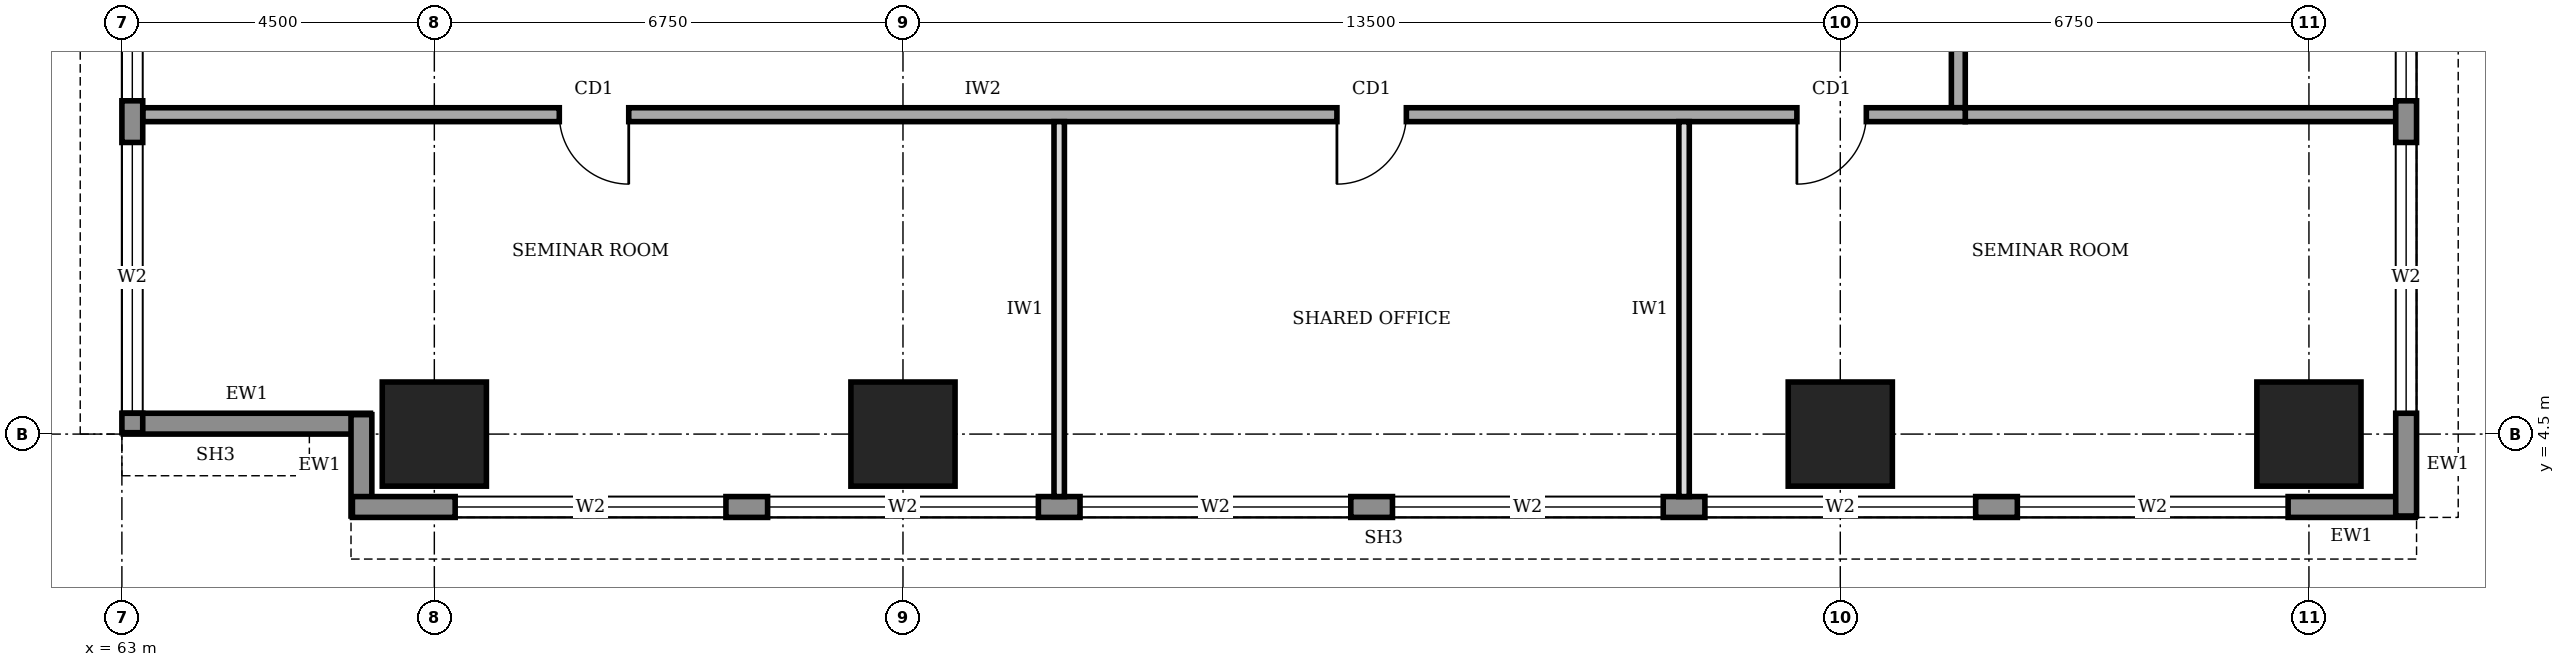
"""IFC4 building model, lengths in metres.
Left out: names, types, materials, properties, quantities, classifications, styles, units other than length and angle.
Written with IfcOpenShell. Run it as: python <this file> out.ifc"""

import sys

from ifc_helpers import new_model, si_unit, direction, frame, frame_2d, origin, origin_2d, place, context, subcontext, project, spatial, rectangle, extrude, element, fill, save


model = new_model("IFC4")
c1 = context("Model", 3, precision=1e-05, world=origin(), true_north=direction((0.0, 1.0)))
c2 = subcontext(c1, "Body", "Model", "MODEL_VIEW")
j1 = project(units=[si_unit("LENGTHUNIT", "METRE"), si_unit("PLANEANGLEUNIT", "RADIAN")], contexts=[c1])
p1 = place(None, origin())
s1 = spatial("IfcSite", under=j1, at=p1, CompositionType="ELEMENT")
p2 = place(p1, origin())
s2 = spatial("IfcBuilding", under=s1, at=p2, CompositionType="ELEMENT")
p3 = place(p2, frame((0.0, 0.0, 145.0)))
s3 = spatial("IfcBuildingStorey", under=s2, at=p3, CompositionType="ELEMENT", Elevation=145.0)
for number, where, z_axis, x_axis in (
    (1, (67.5, 4.5, 0.0), (0.0, 0.0, 1.0), (1.0, 0.0, 0.0)),
    (2, (74.25, 4.5, 0.0), (0.0, 0.0, 1.0), (1.0, 0.0, 0.0)),
    (3, (87.75, 4.5, 0.0), (0.0, 0.0, 1.0), (1.0, 0.0, 0.0)),
    (4, (94.5, 4.5, 0.0), (0.0, 0.0, 1.0), (1.0, 0.0, 0.0)),
):
    element("IfcColumn", number, at=place(p3, frame(where, z_axis=z_axis, x_axis=x_axis)), inside=s3, PredefinedType="COLUMN", context=c2, shape_type="SweptSolid", body=[
        extrude(rectangle(XDim=1.5, YDim=1.5, at=origin_2d()), origin(), (0.0, 0.0, 1.0), 4.0),
    ])
p4 = place(p3, frame((63.02, 4.65, 0.0), z_axis=(0.0, 0.0, 1.0), x_axis=(1.0, 0.0, 0.0)))
e5 = element("IfcWall", 5, at=p4, inside=s3, PredefinedType="STANDARD", context=c2, shape_type="SweptSolid", body=[
    extrude(rectangle(XDim=3.56, YDim=0.3, at=frame_2d((1.78, 0.0))), origin(), (0.0, 0.0, 1.0), 2.85),
])
p5 = place(p3, frame((66.45, 4.78, 0.0), z_axis=(0.0, 0.0, 1.0), x_axis=(0.0, -1.0, 0.0)))
e6 = element("IfcWall", 6, at=p5, inside=s3, PredefinedType="STANDARD", context=c2, shape_type="SweptSolid", body=[
    extrude(rectangle(XDim=1.46, YDim=0.3, at=frame_2d((0.73, 0.0))), origin(), (0.0, 0.0, 1.0), 3.75),
])
p6 = place(p3, frame((66.32, 3.45, 0.0), z_axis=(0.0, 0.0, 1.0), x_axis=(1.0, 0.0, 0.0)))
e7 = element("IfcWall", 7, at=p6, inside=s3, PredefinedType="STANDARD", context=c2, shape_type="SweptSolid", body=[
    extrude(rectangle(XDim=29.71, YDim=0.3, at=frame_2d((14.855, 0.0))), origin(), (0.0, 0.0, 1.0), 3.75),
])
p7 = place(p6, frame((1.48, 0.0, 0.6)))
e8 = element("IfcOpeningElement", 8, at=p7, cuts=e7, PredefinedType="OPENING", context=c2, shape_type="SweptSolid", body=[
    extrude(rectangle(XDim=3.9, YDim=2.6, at=frame_2d((1.95, 1.3))), frame((0.0, 0.16, 0.0), z_axis=(0.0, -1.0, 0.0), x_axis=(1.0, 0.0, 0.0)), (0.0, 0.0, 1.0), 0.32),
])
p8 = place(p6, frame((5.98, 0.0, 0.6)))
e9 = element("IfcOpeningElement", 9, at=p8, cuts=e7, PredefinedType="OPENING", context=c2, shape_type="SweptSolid", body=[
    extrude(rectangle(XDim=3.9, YDim=2.6, at=frame_2d((1.95, 1.3))), frame((0.0, 0.16, 0.0), z_axis=(0.0, -1.0, 0.0), x_axis=(1.0, 0.0, 0.0)), (0.0, 0.0, 1.0), 0.32),
])
p9 = place(p6, frame((10.48, 0.0, 0.6)))
e10 = element("IfcOpeningElement", 10, at=p9, cuts=e7, PredefinedType="OPENING", context=c2, shape_type="SweptSolid", body=[
    extrude(rectangle(XDim=3.9, YDim=2.6, at=frame_2d((1.95, 1.3))), frame((0.0, 0.16, 0.0), z_axis=(0.0, -1.0, 0.0), x_axis=(1.0, 0.0, 0.0)), (0.0, 0.0, 1.0), 0.32),
])
p10 = place(p6, frame((14.98, 0.0, 0.6)))
e11 = element("IfcOpeningElement", 11, at=p10, cuts=e7, PredefinedType="OPENING", context=c2, shape_type="SweptSolid", body=[
    extrude(rectangle(XDim=3.9, YDim=2.6, at=frame_2d((1.95, 1.3))), frame((0.0, 0.16, 0.0), z_axis=(0.0, -1.0, 0.0), x_axis=(1.0, 0.0, 0.0)), (0.0, 0.0, 1.0), 0.32),
])
p11 = place(p6, frame((19.48, 0.0, 0.6)))
e12 = element("IfcOpeningElement", 12, at=p11, cuts=e7, PredefinedType="OPENING", context=c2, shape_type="SweptSolid", body=[
    extrude(rectangle(XDim=3.9, YDim=2.6, at=frame_2d((1.95, 1.3))), frame((0.0, 0.16, 0.0), z_axis=(0.0, -1.0, 0.0), x_axis=(1.0, 0.0, 0.0)), (0.0, 0.0, 1.0), 0.32),
])
p12 = place(p6, frame((23.98, 0.0, 0.6)))
e13 = element("IfcOpeningElement", 13, at=p12, cuts=e7, PredefinedType="OPENING", context=c2, shape_type="SweptSolid", body=[
    extrude(rectangle(XDim=3.9, YDim=2.6, at=frame_2d((1.95, 1.3))), frame((0.0, 0.16, 0.0), z_axis=(0.0, -1.0, 0.0), x_axis=(1.0, 0.0, 0.0)), (0.0, 0.0, 1.0), 0.32),
])
p13 = place(p3, frame((95.9, 3.32, 0.0), z_axis=(0.0, 0.0, 1.0), x_axis=(0.0, 1.0, 0.0)))
e14 = element("IfcWall", 14, at=p13, inside=s3, PredefinedType="STANDARD", context=c2, shape_type="SweptSolid", body=[
    extrude(rectangle(XDim=33.86, YDim=0.3, at=frame_2d((16.93, 0.0))), origin(), (0.0, 0.0, 1.0), 3.75),
])
p14 = place(p13, frame((1.48, 0.0, 0.6)))
e15 = element("IfcOpeningElement", 15, at=p14, cuts=e14, PredefinedType="OPENING", context=c2, shape_type="SweptSolid", body=[
    extrude(rectangle(XDim=3.9, YDim=2.6, at=frame_2d((1.95, 1.3))), frame((0.0, 0.16, 0.0), z_axis=(0.0, -1.0, 0.0), x_axis=(1.0, 0.0, 0.0)), (0.0, 0.0, 1.0), 0.32),
])
p15 = place(p13, frame((5.98, 0.0, 0.6)))
e16 = element("IfcOpeningElement", 16, at=p15, cuts=e14, PredefinedType="OPENING", context=c2, shape_type="SweptSolid", body=[
    extrude(rectangle(XDim=3.9, YDim=2.6, at=frame_2d((1.95, 1.3))), frame((0.0, 0.16, 0.0), z_axis=(0.0, -1.0, 0.0), x_axis=(1.0, 0.0, 0.0)), (0.0, 0.0, 1.0), 0.32),
])
p16 = place(p13, frame((10.48, 0.0, 0.6)))
e17 = element("IfcOpeningElement", 17, at=p16, cuts=e14, PredefinedType="OPENING", context=c2, shape_type="SweptSolid", body=[
    extrude(rectangle(XDim=3.9, YDim=2.6, at=frame_2d((1.95, 1.3))), frame((0.0, 0.16, 0.0), z_axis=(0.0, -1.0, 0.0), x_axis=(1.0, 0.0, 0.0)), (0.0, 0.0, 1.0), 0.32),
])
p17 = place(p13, frame((14.98, 0.0, 0.6)))
e18 = element("IfcOpeningElement", 18, at=p17, cuts=e14, PredefinedType="OPENING", context=c2, shape_type="SweptSolid", body=[
    extrude(rectangle(XDim=3.9, YDim=2.6, at=frame_2d((1.95, 1.3))), frame((0.0, 0.16, 0.0), z_axis=(0.0, -1.0, 0.0), x_axis=(1.0, 0.0, 0.0)), (0.0, 0.0, 1.0), 0.32),
])
p18 = place(p13, frame((19.48, 0.0, 0.6)))
e19 = element("IfcOpeningElement", 19, at=p18, cuts=e14, PredefinedType="OPENING", context=c2, shape_type="SweptSolid", body=[
    extrude(rectangle(XDim=3.9, YDim=2.6, at=frame_2d((1.95, 1.3))), frame((0.0, 0.16, 0.0), z_axis=(0.0, -1.0, 0.0), x_axis=(1.0, 0.0, 0.0)), (0.0, 0.0, 1.0), 0.32),
])
p19 = place(p13, frame((23.98, 0.0, 0.6)))
e20 = element("IfcOpeningElement", 20, at=p19, cuts=e14, PredefinedType="OPENING", context=c2, shape_type="SweptSolid", body=[
    extrude(rectangle(XDim=3.9, YDim=2.6, at=frame_2d((1.95, 1.3))), frame((0.0, 0.16, 0.0), z_axis=(0.0, -1.0, 0.0), x_axis=(1.0, 0.0, 0.0)), (0.0, 0.0, 1.0), 0.32),
])
p20 = place(p13, frame((28.48, 0.0, 0.6)))
e21 = element("IfcOpeningElement", 21, at=p20, cuts=e14, PredefinedType="OPENING", context=c2, shape_type="SweptSolid", body=[
    extrude(rectangle(XDim=3.9, YDim=2.6, at=frame_2d((1.95, 1.3))), frame((0.0, 0.16, 0.0), z_axis=(0.0, -1.0, 0.0), x_axis=(1.0, 0.0, 0.0)), (0.0, 0.0, 1.0), 0.32),
])
p21 = place(p3, frame((63.15, 35.98, 0.0), z_axis=(0.0, 0.0, 1.0), x_axis=(0.0, -1.0, 0.0)))
e22 = element("IfcWall", 22, at=p21, inside=s3, PredefinedType="STANDARD", context=c2, shape_type="SweptSolid", body=[
    extrude(rectangle(XDim=31.46, YDim=0.3, at=frame_2d((15.73, 0.0))), origin(), (0.0, 0.0, 1.0), 3.75),
])
p22 = place(p21, frame((27.28, 0.0, 0.6)))
e23 = element("IfcOpeningElement", 23, at=p22, cuts=e22, PredefinedType="OPENING", context=c2, shape_type="SweptSolid", body=[
    extrude(rectangle(XDim=3.9, YDim=2.6, at=frame_2d((1.95, 1.3))), frame((0.0, 0.16, 0.0), z_axis=(0.0, -1.0, 0.0), x_axis=(1.0, 0.0, 0.0)), (0.0, 0.0, 1.0), 0.32),
])
p23 = place(p21, frame((22.78, 0.0, 0.6)))
e24 = element("IfcOpeningElement", 24, at=p23, cuts=e22, PredefinedType="OPENING", context=c2, shape_type="SweptSolid", body=[
    extrude(rectangle(XDim=3.9, YDim=2.6, at=frame_2d((1.95, 1.3))), frame((0.0, 0.16, 0.0), z_axis=(0.0, -1.0, 0.0), x_axis=(1.0, 0.0, 0.0)), (0.0, 0.0, 1.0), 0.32),
])
p24 = place(p21, frame((18.28, 0.0, 0.6)))
e25 = element("IfcOpeningElement", 25, at=p24, cuts=e22, PredefinedType="OPENING", context=c2, shape_type="SweptSolid", body=[
    extrude(rectangle(XDim=3.9, YDim=2.6, at=frame_2d((1.95, 1.3))), frame((0.0, 0.16, 0.0), z_axis=(0.0, -1.0, 0.0), x_axis=(1.0, 0.0, 0.0)), (0.0, 0.0, 1.0), 0.32),
])
p25 = place(p21, frame((13.78, 0.0, 0.6)))
e26 = element("IfcOpeningElement", 26, at=p25, cuts=e22, PredefinedType="OPENING", context=c2, shape_type="SweptSolid", body=[
    extrude(rectangle(XDim=3.9, YDim=2.6, at=frame_2d((1.95, 1.3))), frame((0.0, 0.16, 0.0), z_axis=(0.0, -1.0, 0.0), x_axis=(1.0, 0.0, 0.0)), (0.0, 0.0, 1.0), 0.32),
])
p26 = place(p21, frame((9.28, 0.0, 0.6)))
e27 = element("IfcOpeningElement", 27, at=p26, cuts=e22, PredefinedType="OPENING", context=c2, shape_type="SweptSolid", body=[
    extrude(rectangle(XDim=3.9, YDim=2.6, at=frame_2d((1.95, 1.3))), frame((0.0, 0.16, 0.0), z_axis=(0.0, -1.0, 0.0), x_axis=(1.0, 0.0, 0.0)), (0.0, 0.0, 1.0), 0.32),
])
p27 = place(p21, frame((4.78, 0.0, 0.6)))
e28 = element("IfcOpeningElement", 28, at=p27, cuts=e22, PredefinedType="OPENING", context=c2, shape_type="SweptSolid", body=[
    extrude(rectangle(XDim=3.9, YDim=2.6, at=frame_2d((1.95, 1.3))), frame((0.0, 0.16, 0.0), z_axis=(0.0, -1.0, 0.0), x_axis=(1.0, 0.0, 0.0)), (0.0, 0.0, 1.0), 0.32),
])
p28 = place(p3, frame((63.3, 9.1, 0.0), z_axis=(0.0, 0.0, 1.0), x_axis=(1.0, 0.0, 0.0)))
e29 = element("IfcWall", 29, at=p28, inside=s3, PredefinedType="SOLIDWALL", context=c2, shape_type="SweptSolid", body=[
    extrude(rectangle(XDim=26.25, YDim=0.2, at=frame_2d((13.125, 0.0))), origin(), (0.0, 0.0, 1.0), 3.75),
])
p29 = place(p28, frame((6.0, 0.0, 0.0)))
e30 = element("IfcOpeningElement", 30, at=p29, cuts=e29, PredefinedType="OPENING", context=c2, shape_type="SweptSolid", body=[
    extrude(rectangle(XDim=1.0, YDim=2.1, at=frame_2d((0.5, 1.05))), frame((0.0, 0.11, 0.0), z_axis=(0.0, -1.0, 0.0), x_axis=(1.0, 0.0, 0.0)), (0.0, 0.0, 1.0), 0.22),
])
p30 = place(p28, frame((17.2, 0.0, 0.0)))
e31 = element("IfcOpeningElement", 31, at=p30, cuts=e29, PredefinedType="OPENING", context=c2, shape_type="SweptSolid", body=[
    extrude(rectangle(XDim=1.0, YDim=2.1, at=frame_2d((0.5, 1.05))), frame((0.0, 0.11, 0.0), z_axis=(0.0, -1.0, 0.0), x_axis=(1.0, 0.0, 0.0)), (0.0, 0.0, 1.0), 0.22),
])
p31 = place(p28, frame((23.825, 0.0, 0.0)))
e32 = element("IfcOpeningElement", 32, at=p31, cuts=e29, PredefinedType="OPENING", context=c2, shape_type="SweptSolid", body=[
    extrude(rectangle(XDim=1.0, YDim=2.1, at=frame_2d((0.5, 1.05))), frame((0.0, 0.11, 0.0), z_axis=(0.0, -1.0, 0.0), x_axis=(1.0, 0.0, 0.0)), (0.0, 0.0, 1.0), 0.22),
])
p32 = place(p3, frame((89.45, 9.2, 0.0), z_axis=(0.0, 0.0, 1.0), x_axis=(0.0, 1.0, 0.0)))
e33 = element("IfcWall", 33, at=p32, inside=s3, PredefinedType="SOLIDWALL", context=c2, shape_type="SweptSolid", body=[
    extrude(rectangle(XDim=23.8, YDim=0.2, at=frame_2d((11.9, 0.0))), origin(), (0.0, 0.0, 1.0), 3.75),
])
p33 = place(p32, frame((1.55, 0.0, 0.0)))
e34 = element("IfcOpeningElement", 34, at=p33, cuts=e33, PredefinedType="OPENING", context=c2, shape_type="SweptSolid", body=[
    extrude(rectangle(XDim=1.0, YDim=2.1, at=frame_2d((0.5, 1.05))), frame((0.0, 0.11, 0.0), z_axis=(0.0, -1.0, 0.0), x_axis=(1.0, 0.0, 0.0)), (0.0, 0.0, 1.0), 0.22),
])
p34 = place(p32, frame((5.55, 0.0, 0.0)))
e35 = element("IfcOpeningElement", 35, at=p34, cuts=e33, PredefinedType="OPENING", context=c2, shape_type="SweptSolid", body=[
    extrude(rectangle(XDim=0.9, YDim=2.1, at=frame_2d((0.45, 1.05))), frame((0.0, 0.11, 0.0), z_axis=(0.0, -1.0, 0.0), x_axis=(1.0, 0.0, 0.0)), (0.0, 0.0, 1.0), 0.22),
])
p35 = place(p32, frame((10.35, 0.0, 0.0)))
e36 = element("IfcOpeningElement", 36, at=p35, cuts=e33, PredefinedType="OPENING", context=c2, shape_type="SweptSolid", body=[
    extrude(rectangle(XDim=0.9, YDim=2.1, at=frame_2d((0.45, 1.05))), frame((0.0, 0.11, 0.0), z_axis=(0.0, -1.0, 0.0), x_axis=(1.0, 0.0, 0.0)), (0.0, 0.0, 1.0), 0.22),
])
p36 = place(p32, frame((13.4, 0.0, 0.0)))
e37 = element("IfcOpeningElement", 37, at=p36, cuts=e33, PredefinedType="OPENING", context=c2, shape_type="SweptSolid", body=[
    extrude(rectangle(XDim=0.9, YDim=2.1, at=frame_2d((0.45, 1.05))), frame((0.0, 0.11, 0.0), z_axis=(0.0, -1.0, 0.0), x_axis=(1.0, 0.0, 0.0)), (0.0, 0.0, 1.0), 0.22),
])
p37 = place(p32, frame((16.3, 0.0, 0.0)))
e38 = element("IfcOpeningElement", 38, at=p37, cuts=e33, PredefinedType="OPENING", context=c2, shape_type="SweptSolid", body=[
    extrude(rectangle(XDim=1.0, YDim=2.1, at=frame_2d((0.5, 1.05))), frame((0.0, 0.11, 0.0), z_axis=(0.0, -1.0, 0.0), x_axis=(1.0, 0.0, 0.0)), (0.0, 0.0, 1.0), 0.22),
])
p38 = place(p32, frame((8.2, 0.0, 0.0)))
e39 = element("IfcOpeningElement", 39, at=p38, cuts=e33, PredefinedType="OPENING", context=c2, shape_type="SweptSolid", body=[
    extrude(rectangle(XDim=1.0, YDim=2.1, at=frame_2d((0.5, 1.05))), frame((0.0, 0.11, 0.0), z_axis=(0.0, -1.0, 0.0), x_axis=(1.0, 0.0, 0.0)), (0.0, 0.0, 1.0), 0.22),
])
p39 = place(p32, frame((20.3, 0.0, 0.0)))
e40 = element("IfcOpeningElement", 40, at=p39, cuts=e33, PredefinedType="OPENING", context=c2, shape_type="SweptSolid", body=[
    extrude(rectangle(XDim=1.0, YDim=2.1, at=frame_2d((0.5, 1.05))), frame((0.0, 0.11, 0.0), z_axis=(0.0, -1.0, 0.0), x_axis=(1.0, 0.0, 0.0)), (0.0, 0.0, 1.0), 0.22),
])
p40 = place(p3, frame((89.55, 9.1, 0.0), z_axis=(0.0, 0.0, 1.0), x_axis=(1.0, 0.0, 0.0)))
e41 = element("IfcWall", 41, at=p40, inside=s3, PredefinedType="SOLIDWALL", context=c2, shape_type="SweptSolid", body=[
    extrude(rectangle(XDim=6.2, YDim=0.2, at=frame_2d((3.1, 0.0))), origin(), (0.0, 0.0, 1.0), 3.75),
])
for number, where, z_axis, x_axis in (
    (42, (76.5, 3.6, 0.0), (0.0, 0.0, 1.0), (0.0, 1.0, 0.0)),
    (43, (85.5, 3.6, 0.0), (0.0, 0.0, 1.0), (0.0, 1.0, 0.0)),
):
    element("IfcWall", number, at=place(p3, frame(where, z_axis=z_axis, x_axis=x_axis)), inside=s3, PredefinedType="PARTITIONING", context=c2, shape_type="SweptSolid", body=[
        extrude(rectangle(XDim=5.4, YDim=0.15, at=frame_2d((2.7, 0.0))), origin(), (0.0, 0.0, 1.0), 3.75),
    ])
p41 = place(p7, origin())
e44 = element("IfcWindow", 44, at=p41, inside=s3, PartitioningType="SINGLE_PANEL", PredefinedType="WINDOW", context=c2, shape_type="SweptSolid", body=[
    extrude(rectangle(XDim=3.9, YDim=2.6, at=frame_2d((1.95, 1.3))), frame((0.0, 0.03, 0.0), z_axis=(0.0, -1.0, 0.0), x_axis=(1.0, 0.0, 0.0)), (0.0, 0.0, 1.0), 0.06),
])
fill(e8, e44)
p42 = place(p8, origin())
e45 = element("IfcWindow", 45, at=p42, inside=s3, PartitioningType="SINGLE_PANEL", PredefinedType="WINDOW", context=c2, shape_type="SweptSolid", body=[
    extrude(rectangle(XDim=3.9, YDim=2.6, at=frame_2d((1.95, 1.3))), frame((0.0, 0.03, 0.0), z_axis=(0.0, -1.0, 0.0), x_axis=(1.0, 0.0, 0.0)), (0.0, 0.0, 1.0), 0.06),
])
fill(e9, e45)
p43 = place(p9, origin())
e46 = element("IfcWindow", 46, at=p43, inside=s3, PartitioningType="SINGLE_PANEL", PredefinedType="WINDOW", context=c2, shape_type="SweptSolid", body=[
    extrude(rectangle(XDim=3.9, YDim=2.6, at=frame_2d((1.95, 1.3))), frame((0.0, 0.03, 0.0), z_axis=(0.0, -1.0, 0.0), x_axis=(1.0, 0.0, 0.0)), (0.0, 0.0, 1.0), 0.06),
])
fill(e10, e46)
p44 = place(p10, origin())
e47 = element("IfcWindow", 47, at=p44, inside=s3, PartitioningType="SINGLE_PANEL", PredefinedType="WINDOW", context=c2, shape_type="SweptSolid", body=[
    extrude(rectangle(XDim=3.9, YDim=2.6, at=frame_2d((1.95, 1.3))), frame((0.0, 0.03, 0.0), z_axis=(0.0, -1.0, 0.0), x_axis=(1.0, 0.0, 0.0)), (0.0, 0.0, 1.0), 0.06),
])
fill(e11, e47)
p45 = place(p11, origin())
e48 = element("IfcWindow", 48, at=p45, inside=s3, PartitioningType="SINGLE_PANEL", PredefinedType="WINDOW", context=c2, shape_type="SweptSolid", body=[
    extrude(rectangle(XDim=3.9, YDim=2.6, at=frame_2d((1.95, 1.3))), frame((0.0, 0.03, 0.0), z_axis=(0.0, -1.0, 0.0), x_axis=(1.0, 0.0, 0.0)), (0.0, 0.0, 1.0), 0.06),
])
fill(e12, e48)
p46 = place(p12, origin())
e49 = element("IfcWindow", 49, at=p46, inside=s3, PartitioningType="SINGLE_PANEL", PredefinedType="WINDOW", context=c2, shape_type="SweptSolid", body=[
    extrude(rectangle(XDim=3.9, YDim=2.6, at=frame_2d((1.95, 1.3))), frame((0.0, 0.03, 0.0), z_axis=(0.0, -1.0, 0.0), x_axis=(1.0, 0.0, 0.0)), (0.0, 0.0, 1.0), 0.06),
])
fill(e13, e49)
p47 = place(p14, origin())
e50 = element("IfcWindow", 50, at=p47, inside=s3, PartitioningType="SINGLE_PANEL", PredefinedType="WINDOW", context=c2, shape_type="SweptSolid", body=[
    extrude(rectangle(XDim=3.9, YDim=2.6, at=frame_2d((1.95, 1.3))), frame((0.0, 0.03, 0.0), z_axis=(0.0, -1.0, 0.0), x_axis=(1.0, 0.0, 0.0)), (0.0, 0.0, 1.0), 0.06),
])
fill(e15, e50)
p48 = place(p15, origin())
e51 = element("IfcWindow", 51, at=p48, inside=s3, PartitioningType="SINGLE_PANEL", PredefinedType="WINDOW", context=c2, shape_type="SweptSolid", body=[
    extrude(rectangle(XDim=3.9, YDim=2.6, at=frame_2d((1.95, 1.3))), frame((0.0, 0.03, 0.0), z_axis=(0.0, -1.0, 0.0), x_axis=(1.0, 0.0, 0.0)), (0.0, 0.0, 1.0), 0.06),
])
fill(e16, e51)
p49 = place(p22, origin())
e52 = element("IfcWindow", 52, at=p49, inside=s3, PartitioningType="SINGLE_PANEL", PredefinedType="WINDOW", context=c2, shape_type="SweptSolid", body=[
    extrude(rectangle(XDim=3.9, YDim=2.6, at=frame_2d((1.95, 1.3))), frame((0.0, 0.03, 0.0), z_axis=(0.0, -1.0, 0.0), x_axis=(1.0, 0.0, 0.0)), (0.0, 0.0, 1.0), 0.06),
])
fill(e23, e52)
p50 = place(p23, origin())
e53 = element("IfcWindow", 53, at=p50, inside=s3, PartitioningType="SINGLE_PANEL", PredefinedType="WINDOW", context=c2, shape_type="SweptSolid", body=[
    extrude(rectangle(XDim=3.9, YDim=2.6, at=frame_2d((1.95, 1.3))), frame((0.0, 0.03, 0.0), z_axis=(0.0, -1.0, 0.0), x_axis=(1.0, 0.0, 0.0)), (0.0, 0.0, 1.0), 0.06),
])
fill(e24, e53)
p51 = place(p29, frame((1.0, 0.0, 0.0), z_axis=(0.0, 0.0, 1.0), x_axis=(-1.0, 0.0, 0.0)))
e54 = element("IfcDoor", 54, at=p51, inside=s3, OperationType="SINGLE_SWING_LEFT", PredefinedType="DOOR", context=c2, shape_type="SweptSolid", body=[
    extrude(rectangle(XDim=1.0, YDim=2.1, at=frame_2d((0.5, 1.05))), frame((0.0, 0.025, 0.0), z_axis=(0.0, -1.0, 0.0), x_axis=(1.0, 0.0, 0.0)), (0.0, 0.0, 1.0), 0.05),
])
fill(e30, e54)
p52 = place(p30, frame((1.0, 0.0, 0.0), z_axis=(0.0, 0.0, 1.0), x_axis=(-1.0, 0.0, 0.0)))
e55 = element("IfcDoor", 55, at=p52, inside=s3, OperationType="SINGLE_SWING_RIGHT", PredefinedType="DOOR", context=c2, shape_type="SweptSolid", body=[
    extrude(rectangle(XDim=1.0, YDim=2.1, at=frame_2d((0.5, 1.05))), frame((0.0, 0.025, 0.0), z_axis=(0.0, -1.0, 0.0), x_axis=(1.0, 0.0, 0.0)), (0.0, 0.0, 1.0), 0.05),
])
fill(e31, e55)
p53 = place(p31, frame((1.0, 0.0, 0.0), z_axis=(0.0, 0.0, 1.0), x_axis=(-1.0, 0.0, 0.0)))
e56 = element("IfcDoor", 56, at=p53, inside=s3, OperationType="SINGLE_SWING_RIGHT", PredefinedType="DOOR", context=c2, shape_type="SweptSolid", body=[
    extrude(rectangle(XDim=1.0, YDim=2.1, at=frame_2d((0.5, 1.05))), frame((0.0, 0.025, 0.0), z_axis=(0.0, -1.0, 0.0), x_axis=(1.0, 0.0, 0.0)), (0.0, 0.0, 1.0), 0.05),
])
fill(e32, e56)
save(model, sys.argv[1])
